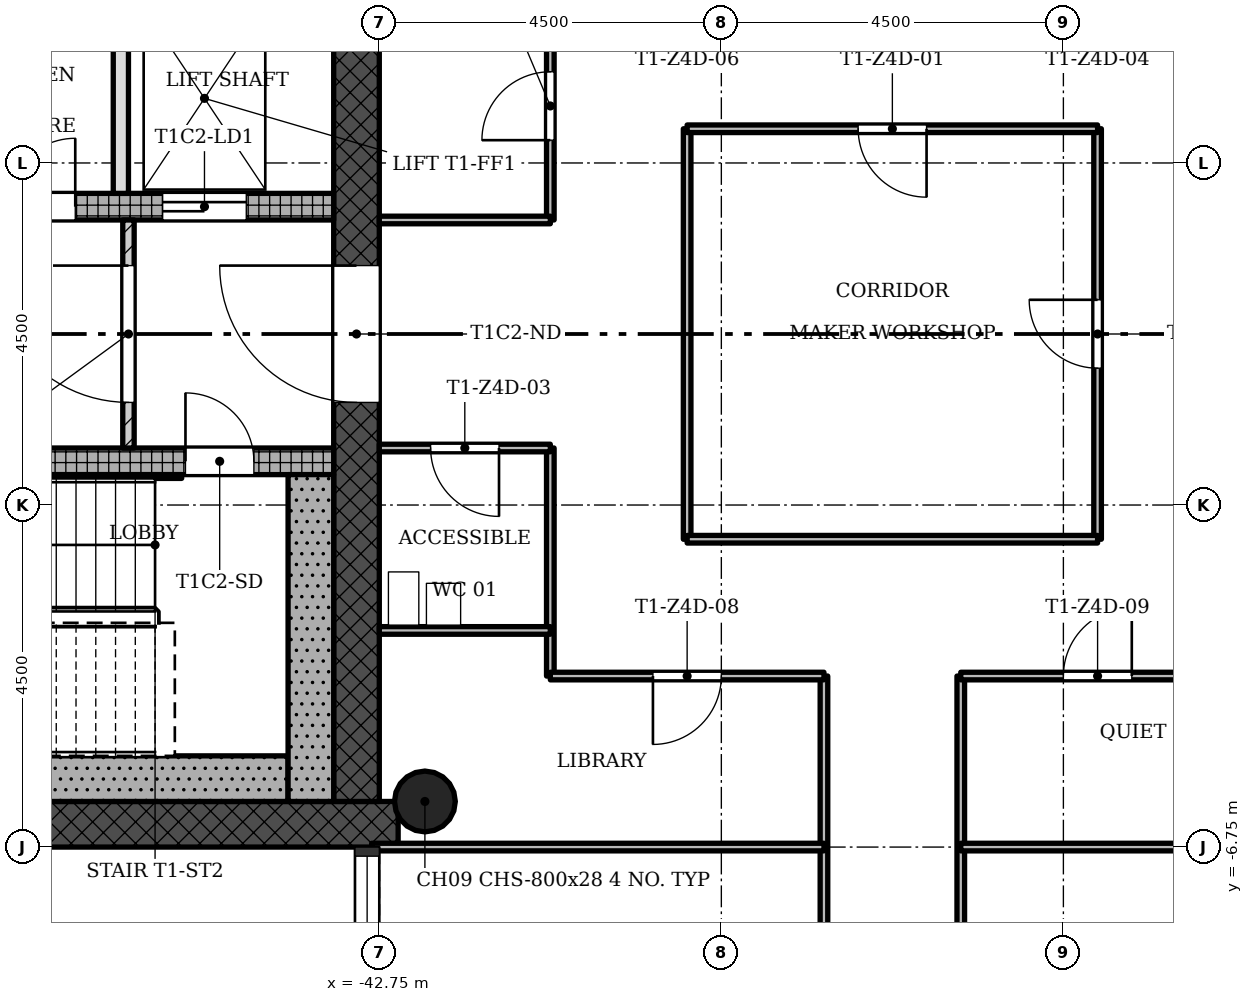
"""IFC4 building model, lengths in metres.
Left out: names, types, materials, properties, quantities, classifications, styles, units other than length and angle.
Written with IfcOpenShell. Run it as: python <this file> out.ifc"""

import sys

from ifc_helpers import new_model, si_unit, direction, frame, frame_2d, origin, origin_2d, place, context, subcontext, project, spatial, rectangle, hollow_circle, extrude, element, fill, save


model = new_model("IFC4")
c1 = context("Model", 3, precision=1e-05, world=origin(), true_north=direction((0.0, 1.0)))
c2 = subcontext(c1, "Body", "Model", "MODEL_VIEW")
j1 = project(units=[si_unit("LENGTHUNIT", "METRE"), si_unit("PLANEANGLEUNIT", "RADIAN")], contexts=[c1])
p1 = place(None, origin())
s1 = spatial("IfcSite", under=j1, at=p1, CompositionType="ELEMENT")
p2 = place(p1, origin())
s2 = spatial("IfcBuilding", under=s1, at=p2, CompositionType="ELEMENT")
p3 = place(p2, frame((0.0, 0.0, 199.4)))
s3 = spatial("IfcBuildingStorey", under=s2, at=p3, CompositionType="ELEMENT", Elevation=199.4)
p4 = place(p3, frame((-51.15, -6.45, 0.0), z_axis=(0.0, 0.0, 1.0), x_axis=(1.0, 0.0, 0.0)))
e1 = element("IfcWall", 1, at=p4, inside=s3, PredefinedType="SHEAR", context=c2, shape_type="SweptSolid", body=[
    extrude(rectangle(XDim=8.648, YDim=0.6, at=frame_2d((4.324, 0.0))), origin(), (0.0, 0.0, 1.0), 3.4),
])
p5 = place(p3, frame((-43.05, -6.15, 0.0), z_axis=(0.0, 0.0, 1.0), x_axis=(0.0, 1.0, 0.0)))
e2 = element("IfcWall", 2, at=p5, inside=s3, PredefinedType="SHEAR", context=c2, shape_type="SweptSolid", body=[
    extrude(rectangle(XDim=12.9, YDim=0.6, at=frame_2d((6.45, 0.0))), origin(), (0.0, 0.0, 1.0), 3.4),
])
p6 = place(p5, frame((5.25, 0.0, 0.0)))
e3 = element("IfcOpeningElement", 3, at=p6, cuts=e2, PredefinedType="OPENING", context=c2, shape_type="SweptSolid", body=[
    extrude(rectangle(XDim=1.8, YDim=2.1, at=frame_2d((0.9, 1.05))), frame((0.0, 0.31, 0.0), z_axis=(0.0, -1.0, 0.0), x_axis=(1.0, 0.0, 0.0)), (0.0, 0.0, 1.0), 0.62),
])
p7 = place(p3, frame((-51.15, -1.675, 0.0), z_axis=(0.0, 0.0, 1.0), x_axis=(1.0, 0.0, 0.0)))
e4 = element("IfcWall", 4, at=p7, inside=s3, PredefinedType="SHEAR", context=c2, shape_type="SweptSolid", body=[
    extrude(rectangle(XDim=7.8, YDim=0.35, at=frame_2d((3.9, 0.0))), origin(), (0.0, 0.0, 1.0), 3.4),
])
p8 = place(p7, frame((5.85, 0.0, 0.0)))
e5 = element("IfcOpeningElement", 5, at=p8, cuts=e4, PredefinedType="OPENING", context=c2, shape_type="SweptSolid", body=[
    extrude(rectangle(XDim=0.9, YDim=2.1, at=frame_2d((0.45, 1.05))), frame((0.0, 0.185, 0.0), z_axis=(0.0, -1.0, 0.0), x_axis=(1.0, 0.0, 0.0)), (0.0, 0.0, 1.0), 0.37),
])
p9 = place(p3, frame((-51.15, 1.675, 0.0), z_axis=(0.0, 0.0, 1.0), x_axis=(1.0, 0.0, 0.0)))
e6 = element("IfcWall", 6, at=p9, inside=s3, PredefinedType="SHEAR", context=c2, shape_type="SweptSolid", body=[
    extrude(rectangle(XDim=7.8, YDim=0.35, at=frame_2d((3.9, 0.0))), origin(), (0.0, 0.0, 1.0), 3.4),
])
p10 = place(p9, frame((5.55, 0.0, 0.0)))
e7 = element("IfcOpeningElement", 7, at=p10, cuts=e6, PredefinedType="OPENING", context=c2, shape_type="SweptSolid", body=[
    extrude(rectangle(XDim=1.1, YDim=2.1, at=frame_2d((0.55, 1.05))), frame((0.0, 0.185, 0.0), z_axis=(0.0, -1.0, 0.0), x_axis=(1.0, 0.0, 0.0)), (0.0, 0.0, 1.0), 0.37),
])
p11 = place(p9, frame((1.2, 0.0, 0.0)))
e8 = element("IfcOpeningElement", 8, at=p11, cuts=e6, PredefinedType="OPENING", context=c2, shape_type="SweptSolid", body=[
    extrude(rectangle(XDim=1.1, YDim=2.1, at=frame_2d((0.55, 1.05))), frame((0.0, 0.185, 0.0), z_axis=(0.0, -1.0, 0.0), x_axis=(1.0, 0.0, 0.0)), (0.0, 0.0, 1.0), 0.37),
])
p12 = place(p9, frame((3.5, 0.0, 0.0)))
e9 = element("IfcOpeningElement", 9, at=p12, cuts=e6, PredefinedType="OPENING", context=c2, shape_type="SweptSolid", body=[
    extrude(rectangle(XDim=0.9, YDim=2.1, at=frame_2d((0.45, 1.05))), frame((0.0, 0.185, 0.0), z_axis=(0.0, -1.0, 0.0), x_axis=(1.0, 0.0, 0.0)), (0.0, 0.0, 1.0), 0.37),
])
p13 = place(p3, frame((-42.15, -6.15, 0.0), z_axis=(0.0, 0.0, 1.0), x_axis=(1.0, 0.0, 0.0)))
e10 = element("IfcColumn", 10, at=p13, inside=s3, PredefinedType="COLUMN", context=c2, shape_type="SweptSolid", body=[
    extrude(hollow_circle(Radius=0.4, WallThickness=0.028, at=origin_2d()), origin(), (0.0, 0.0, 1.0), 3.4),
])
p14 = place(p3, frame((-46.05, 1.5, 0.0), z_axis=(0.0, 0.0, 1.0), x_axis=(0.0, -1.0, 0.0)))
e11 = element("IfcWall", 11, at=p14, inside=s3, PredefinedType="PARTITIONING", context=c2, shape_type="SweptSolid", body=[
    extrude(rectangle(XDim=3.0, YDim=0.15, at=frame_2d((1.5, 0.0))), origin(), (0.0, 0.0, 1.0), 3.0),
])
p15 = place(p14, frame((0.6, 0.0, 0.0)))
e12 = element("IfcOpeningElement", 12, at=p15, cuts=e11, PredefinedType="OPENING", context=c2, shape_type="SweptSolid", body=[
    extrude(rectangle(XDim=1.8, YDim=2.1, at=frame_2d((0.9, 1.05))), frame((0.0, 0.085, 0.0), z_axis=(0.0, -1.0, 0.0), x_axis=(1.0, 0.0, 0.0)), (0.0, 0.0, 1.0), 0.17),
])
p16 = place(p3, frame((-46.15, 6.15, 0.0), z_axis=(0.0, 0.0, 1.0), x_axis=(0.0, -1.0, 0.0)))
e13 = element("IfcWall", 13, at=p16, inside=s3, PredefinedType="SOLIDWALL", context=c2, shape_type="SweptSolid", body=[
    extrude(rectangle(XDim=4.3, YDim=0.2, at=frame_2d((2.15, 0.0))), origin(), (0.0, 0.0, 1.0), 3.0),
])
p17 = place(p3, frame((-40.5, -4.5, 0.0), z_axis=(0.0, 0.0, 1.0), x_axis=(0.0, 1.0, 0.0)))
e14 = element("IfcWall", 14, at=p17, inside=s3, PredefinedType="PARTITIONING", context=c2, shape_type="SweptSolid", body=[
    extrude(rectangle(XDim=3.0, YDim=0.1, at=frame_2d((1.5, 0.0))), origin(), (0.0, 0.0, 1.0), 3.0),
])
p18 = place(p3, frame((-40.5, 1.5, 0.0), z_axis=(0.0, 0.0, 1.0), x_axis=(0.0, 1.0, 0.0)))
e15 = element("IfcWall", 15, at=p18, inside=s3, PredefinedType="PARTITIONING", context=c2, shape_type="SweptSolid", body=[
    extrude(rectangle(XDim=5.25, YDim=0.1, at=frame_2d((2.625, 0.0))), origin(), (0.0, 0.0, 1.0), 3.0),
])
p19 = place(p18, frame((1.05, 0.0, 0.0)))
e16 = element("IfcOpeningElement", 16, at=p19, cuts=e15, PredefinedType="OPENING", context=c2, shape_type="SweptSolid", body=[
    extrude(rectangle(XDim=0.9, YDim=2.1, at=frame_2d((0.45, 1.05))), frame((0.0, 0.06, 0.0), z_axis=(0.0, -1.0, 0.0), x_axis=(1.0, 0.0, 0.0)), (0.0, 0.0, 1.0), 0.12),
])
p20 = place(p3, frame((-38.7, -2.7, 0.0), z_axis=(0.0, 0.0, 1.0), x_axis=(0.0, 1.0, 0.0)))
e17 = element("IfcWall", 17, at=p20, inside=s3, PredefinedType="PARTITIONING", context=c2, shape_type="SweptSolid", body=[
    extrude(rectangle(XDim=5.4, YDim=0.1, at=frame_2d((2.7, 0.0))), origin(), (0.0, 0.0, 1.0), 3.0),
])
p21 = place(p3, frame((-36.9, -11.25, 0.0), z_axis=(0.0, 0.0, 1.0), x_axis=(0.0, 1.0, 0.0)))
e18 = element("IfcWall", 18, at=p21, inside=s3, PredefinedType="PARTITIONING", context=c2, shape_type="SweptSolid", body=[
    extrude(rectangle(XDim=6.75, YDim=0.1, at=frame_2d((3.375, 0.0))), origin(), (0.0, 0.0, 1.0), 3.0),
])
p22 = place(p21, frame((1.8, 0.0, 0.0)))
e19 = element("IfcOpeningElement", 19, at=p22, cuts=e18, PredefinedType="OPENING", context=c2, shape_type="SweptSolid", body=[
    extrude(rectangle(XDim=0.9, YDim=2.1, at=frame_2d((0.45, 1.05))), frame((0.0, 0.06, 0.0), z_axis=(0.0, -1.0, 0.0), x_axis=(1.0, 0.0, 0.0)), (0.0, 0.0, 1.0), 0.12),
])
p23 = place(p3, frame((-35.1, -11.25, 0.0), z_axis=(0.0, 0.0, 1.0), x_axis=(0.0, 1.0, 0.0)))
e20 = element("IfcWall", 20, at=p23, inside=s3, PredefinedType="PARTITIONING", context=c2, shape_type="SweptSolid", body=[
    extrude(rectangle(XDim=6.75, YDim=0.1, at=frame_2d((3.375, 0.0))), origin(), (0.0, 0.0, 1.0), 3.0),
])
p24 = place(p23, frame((1.8, 0.0, 0.0)))
e21 = element("IfcOpeningElement", 21, at=p24, cuts=e20, PredefinedType="OPENING", context=c2, shape_type="SweptSolid", body=[
    extrude(rectangle(XDim=0.9, YDim=2.1, at=frame_2d((0.45, 1.05))), frame((0.0, 0.06, 0.0), z_axis=(0.0, -1.0, 0.0), x_axis=(1.0, 0.0, 0.0)), (0.0, 0.0, 1.0), 0.12),
])
p25 = place(p3, frame((-33.3, -2.7, 0.0), z_axis=(0.0, 0.0, 1.0), x_axis=(0.0, 1.0, 0.0)))
e22 = element("IfcWall", 22, at=p25, inside=s3, PredefinedType="PARTITIONING", context=c2, shape_type="SweptSolid", body=[
    extrude(rectangle(XDim=5.4, YDim=0.1, at=frame_2d((2.7, 0.0))), origin(), (0.0, 0.0, 1.0), 3.0),
])
p26 = place(p25, frame((2.25, 0.0, 0.0)))
e23 = element("IfcOpeningElement", 23, at=p26, cuts=e22, PredefinedType="OPENING", context=c2, shape_type="SweptSolid", body=[
    extrude(rectangle(XDim=0.9, YDim=2.1, at=frame_2d((0.45, 1.05))), frame((0.0, 0.06, 0.0), z_axis=(0.0, -1.0, 0.0), x_axis=(1.0, 0.0, 0.0)), (0.0, 0.0, 1.0), 0.12),
])
for number, where, z_axis, x_axis in (
    (24, (-42.85, -6.75, 0.0), (0.0, 0.0, 1.0), (1.0, 0.0, 0.0)),
    (25, (-35.1, -6.75, 0.0), (0.0, 0.0, 1.0), (1.0, 0.0, 0.0)),
):
    element("IfcWall", number, at=place(p3, frame(where, z_axis=z_axis, x_axis=x_axis)), inside=s3, PredefinedType="PARTITIONING", context=c2, shape_type="SweptSolid", body=[
        extrude(rectangle(XDim=5.95, YDim=0.1, at=frame_2d((2.975, 0.0))), origin(), (0.0, 0.0, 1.0), 3.0),
    ])
p27 = place(p3, frame((-40.5, -4.5, 0.0), z_axis=(0.0, 0.0, 1.0), x_axis=(1.0, 0.0, 0.0)))
e26 = element("IfcWall", 26, at=p27, inside=s3, PredefinedType="PARTITIONING", context=c2, shape_type="SweptSolid", body=[
    extrude(rectangle(XDim=3.6, YDim=0.1, at=frame_2d((1.8, 0.0))), origin(), (0.0, 0.0, 1.0), 3.0),
])
p28 = place(p27, frame((1.35, 0.0, 0.0)))
e27 = element("IfcOpeningElement", 27, at=p28, cuts=e26, PredefinedType="OPENING", context=c2, shape_type="SweptSolid", body=[
    extrude(rectangle(XDim=0.9, YDim=2.1, at=frame_2d((0.45, 1.05))), frame((0.0, 0.06, 0.0), z_axis=(0.0, -1.0, 0.0), x_axis=(1.0, 0.0, 0.0)), (0.0, 0.0, 1.0), 0.12),
])
p29 = place(p3, frame((-35.1, -4.5, 0.0), z_axis=(0.0, 0.0, 1.0), x_axis=(1.0, 0.0, 0.0)))
e28 = element("IfcWall", 28, at=p29, inside=s3, PredefinedType="PARTITIONING", context=c2, shape_type="SweptSolid", body=[
    extrude(rectangle(XDim=3.6, YDim=0.1, at=frame_2d((1.8, 0.0))), origin(), (0.0, 0.0, 1.0), 3.0),
])
p30 = place(p29, frame((1.35, 0.0, 0.0)))
e29 = element("IfcOpeningElement", 29, at=p30, cuts=e28, PredefinedType="OPENING", context=c2, shape_type="SweptSolid", body=[
    extrude(rectangle(XDim=0.9, YDim=2.1, at=frame_2d((0.45, 1.05))), frame((0.0, 0.06, 0.0), z_axis=(0.0, -1.0, 0.0), x_axis=(1.0, 0.0, 0.0)), (0.0, 0.0, 1.0), 0.12),
])
p31 = place(p3, frame((-42.75, -3.9, 0.0), z_axis=(0.0, 0.0, 1.0), x_axis=(1.0, 0.0, 0.0)))
e30 = element("IfcWall", 30, at=p31, inside=s3, PredefinedType="PARTITIONING", context=c2, shape_type="SweptSolid", body=[
    extrude(rectangle(XDim=2.25, YDim=0.1, at=frame_2d((1.125, 0.0))), origin(), (0.0, 0.0, 1.0), 3.0),
])
p32 = place(p3, frame((-38.7, -2.7, 0.0), z_axis=(0.0, 0.0, 1.0), x_axis=(1.0, 0.0, 0.0)))
e31 = element("IfcWall", 31, at=p32, inside=s3, PredefinedType="PARTITIONING", context=c2, shape_type="SweptSolid", body=[
    extrude(rectangle(XDim=5.4, YDim=0.1, at=frame_2d((2.7, 0.0))), origin(), (0.0, 0.0, 1.0), 3.0),
])
p33 = place(p3, frame((-42.75, -1.5, 0.0), z_axis=(0.0, 0.0, 1.0), x_axis=(1.0, 0.0, 0.0)))
e32 = element("IfcWall", 32, at=p33, inside=s3, PredefinedType="PARTITIONING", context=c2, shape_type="SweptSolid", body=[
    extrude(rectangle(XDim=2.25, YDim=0.1, at=frame_2d((1.125, 0.0))), origin(), (0.0, 0.0, 1.0), 3.0),
])
p34 = place(p33, frame((0.675, 0.0, 0.0)))
e33 = element("IfcOpeningElement", 33, at=p34, cuts=e32, PredefinedType="OPENING", context=c2, shape_type="SweptSolid", body=[
    extrude(rectangle(XDim=0.9, YDim=2.1, at=frame_2d((0.45, 1.05))), frame((0.0, 0.06, 0.0), z_axis=(0.0, -1.0, 0.0), x_axis=(1.0, 0.0, 0.0)), (0.0, 0.0, 1.0), 0.12),
])
p35 = place(p3, frame((-42.75, 1.5, 0.0), z_axis=(0.0, 0.0, 1.0), x_axis=(1.0, 0.0, 0.0)))
e34 = element("IfcWall", 34, at=p35, inside=s3, PredefinedType="PARTITIONING", context=c2, shape_type="SweptSolid", body=[
    extrude(rectangle(XDim=2.25, YDim=0.1, at=frame_2d((1.125, 0.0))), origin(), (0.0, 0.0, 1.0), 3.0),
])
p36 = place(p3, frame((-38.7, 2.7, 0.0), z_axis=(0.0, 0.0, 1.0), x_axis=(1.0, 0.0, 0.0)))
e35 = element("IfcWall", 35, at=p36, inside=s3, PredefinedType="PARTITIONING", context=c2, shape_type="SweptSolid", body=[
    extrude(rectangle(XDim=5.4, YDim=0.1, at=frame_2d((2.7, 0.0))), origin(), (0.0, 0.0, 1.0), 3.0),
])
p37 = place(p36, frame((2.25, 0.0, 0.0)))
e36 = element("IfcOpeningElement", 36, at=p37, cuts=e35, PredefinedType="OPENING", context=c2, shape_type="SweptSolid", body=[
    extrude(rectangle(XDim=0.9, YDim=2.1, at=frame_2d((0.45, 1.05))), frame((0.0, 0.06, 0.0), z_axis=(0.0, -1.0, 0.0), x_axis=(1.0, 0.0, 0.0)), (0.0, 0.0, 1.0), 0.12),
])
p38 = place(p3, frame((-43.95, -5.85, 0.0), z_axis=(0.0, 0.0, 1.0), x_axis=(-1.0, 0.0, 0.0)))
e37 = element("IfcWall", 37, at=p38, inside=s3, PredefinedType="SHEAR", context=c2, shape_type="SweptSolid", body=[
    extrude(rectangle(XDim=6.6, YDim=0.6, at=frame_2d((3.3, 0.0))), origin(), (0.0, 0.0, 1.0), 3.4),
])
p39 = place(p3, frame((-43.65, -1.85, 0.0), z_axis=(0.0, 0.0, 1.0), x_axis=(0.0, -1.0, 0.0)))
e38 = element("IfcWall", 38, at=p39, inside=s3, PredefinedType="SHEAR", context=c2, shape_type="SweptSolid", body=[
    extrude(rectangle(XDim=4.3, YDim=0.6, at=frame_2d((2.15, 0.0))), origin(), (0.0, 0.0, 1.0), 3.4),
])
p40 = place(p3, frame((-45.35, -1.875, 0.0), z_axis=(0.0, 0.0, 1.0), x_axis=(-1.0, 0.0, 0.0)))
e39 = element("IfcWall", 39, at=p40, inside=s3, PredefinedType="SHEAR", context=c2, shape_type="SweptSolid", body=[
    extrude(rectangle(XDim=5.2, YDim=0.05, at=frame_2d((2.6, 0.0))), origin(), (0.0, 0.0, 1.0), 3.4),
])
p41 = place(p15, origin())
e40 = element("IfcDoor", 40, at=p41, inside=s3, OperationType="SINGLE_SWING_LEFT", PredefinedType="DOOR", context=c2, shape_type="SweptSolid", body=[
    extrude(rectangle(XDim=1.8, YDim=2.1, at=frame_2d((0.9, 1.05))), frame((0.0, 0.025, 0.0), z_axis=(0.0, -1.0, 0.0), x_axis=(1.0, 0.0, 0.0)), (0.0, 0.0, 1.0), 0.05),
])
fill(e12, e40)
p42 = place(p37, origin())
e41 = element("IfcDoor", 41, at=p42, inside=s3, OperationType="SINGLE_SWING_RIGHT", PredefinedType="DOOR", context=c2, shape_type="SweptSolid", body=[
    extrude(rectangle(XDim=0.9, YDim=2.1, at=frame_2d((0.45, 1.05))), frame((0.0, 0.025, 0.0), z_axis=(0.0, -1.0, 0.0), x_axis=(1.0, 0.0, 0.0)), (0.0, 0.0, 1.0), 0.05),
])
fill(e36, e41)
p43 = place(p26, origin())
e42 = element("IfcDoor", 42, at=p43, inside=s3, OperationType="SINGLE_SWING_LEFT", PredefinedType="DOOR", context=c2, shape_type="SweptSolid", body=[
    extrude(rectangle(XDim=0.9, YDim=2.1, at=frame_2d((0.45, 1.05))), frame((0.0, 0.025, 0.0), z_axis=(0.0, -1.0, 0.0), x_axis=(1.0, 0.0, 0.0)), (0.0, 0.0, 1.0), 0.05),
])
fill(e23, e42)
p44 = place(p34, origin())
e43 = element("IfcDoor", 43, at=p44, inside=s3, OperationType="SINGLE_SWING_RIGHT", PredefinedType="DOOR", context=c2, shape_type="SweptSolid", body=[
    extrude(rectangle(XDim=0.9, YDim=2.1, at=frame_2d((0.45, 1.05))), frame((0.0, 0.025, 0.0), z_axis=(0.0, -1.0, 0.0), x_axis=(1.0, 0.0, 0.0)), (0.0, 0.0, 1.0), 0.05),
])
fill(e33, e43)
p45 = place(p19, origin())
e44 = element("IfcDoor", 44, at=p45, inside=s3, OperationType="SINGLE_SWING_RIGHT", PredefinedType="DOOR", context=c2, shape_type="SweptSolid", body=[
    extrude(rectangle(XDim=0.9, YDim=2.1, at=frame_2d((0.45, 1.05))), frame((0.0, 0.025, 0.0), z_axis=(0.0, -1.0, 0.0), x_axis=(1.0, 0.0, 0.0)), (0.0, 0.0, 1.0), 0.05),
])
fill(e16, e44)
p46 = place(p28, origin())
e45 = element("IfcDoor", 45, at=p46, inside=s3, OperationType="SINGLE_SWING_LEFT", PredefinedType="DOOR", context=c2, shape_type="SweptSolid", body=[
    extrude(rectangle(XDim=0.9, YDim=2.1, at=frame_2d((0.45, 1.05))), frame((0.0, 0.025, 0.0), z_axis=(0.0, -1.0, 0.0), x_axis=(1.0, 0.0, 0.0)), (0.0, 0.0, 1.0), 0.05),
])
fill(e27, e45)
p47 = place(p30, origin())
e46 = element("IfcDoor", 46, at=p47, inside=s3, OperationType="SINGLE_SWING_LEFT", PredefinedType="DOOR", context=c2, shape_type="SweptSolid", body=[
    extrude(rectangle(XDim=0.9, YDim=2.1, at=frame_2d((0.45, 1.05))), frame((0.0, 0.025, 0.0), z_axis=(0.0, -1.0, 0.0), x_axis=(1.0, 0.0, 0.0)), (0.0, 0.0, 1.0), 0.05),
])
fill(e29, e46)
p48 = place(p8, origin())
e47 = element("IfcDoor", 47, at=p48, inside=s3, OperationType="SINGLE_SWING_RIGHT", PredefinedType="DOOR", context=c2, shape_type="SweptSolid", body=[
    extrude(rectangle(XDim=0.9, YDim=2.1, at=frame_2d((0.45, 1.05))), frame((0.0, 0.025, 0.0), z_axis=(0.0, -1.0, 0.0), x_axis=(1.0, 0.0, 0.0)), (0.0, 0.0, 1.0), 0.05),
])
fill(e5, e47)
p49 = place(p10, origin())
e48 = element("IfcDoor", 48, at=p49, inside=s3, OperationType="SLIDING_TO_LEFT", PredefinedType="DOOR", context=c2, shape_type="SweptSolid", body=[
    extrude(rectangle(XDim=1.1, YDim=2.1, at=frame_2d((0.55, 1.05))), frame((0.0, 0.025, 0.0), z_axis=(0.0, -1.0, 0.0), x_axis=(1.0, 0.0, 0.0)), (0.0, 0.0, 1.0), 0.05),
])
fill(e7, e48)
p50 = place(p12, origin())
e49 = element("IfcDoor", 49, at=p50, inside=s3, OperationType="SINGLE_SWING_LEFT", PredefinedType="DOOR", context=c2, shape_type="SweptSolid", body=[
    extrude(rectangle(XDim=0.9, YDim=2.1, at=frame_2d((0.45, 1.05))), frame((0.0, 0.025, 0.0), z_axis=(0.0, -1.0, 0.0), x_axis=(1.0, 0.0, 0.0)), (0.0, 0.0, 1.0), 0.05),
])
fill(e9, e49)
p51 = place(p6, origin())
e50 = element("IfcDoor", 50, at=p51, inside=s3, OperationType="SINGLE_SWING_LEFT", PredefinedType="DOOR", context=c2, shape_type="SweptSolid", body=[
    extrude(rectangle(XDim=1.8, YDim=2.1, at=frame_2d((0.9, 1.05))), frame((0.0, 0.025, 0.0), z_axis=(0.0, -1.0, 0.0), x_axis=(1.0, 0.0, 0.0)), (0.0, 0.0, 1.0), 0.05),
])
fill(e3, e50)
save(model, sys.argv[1])
